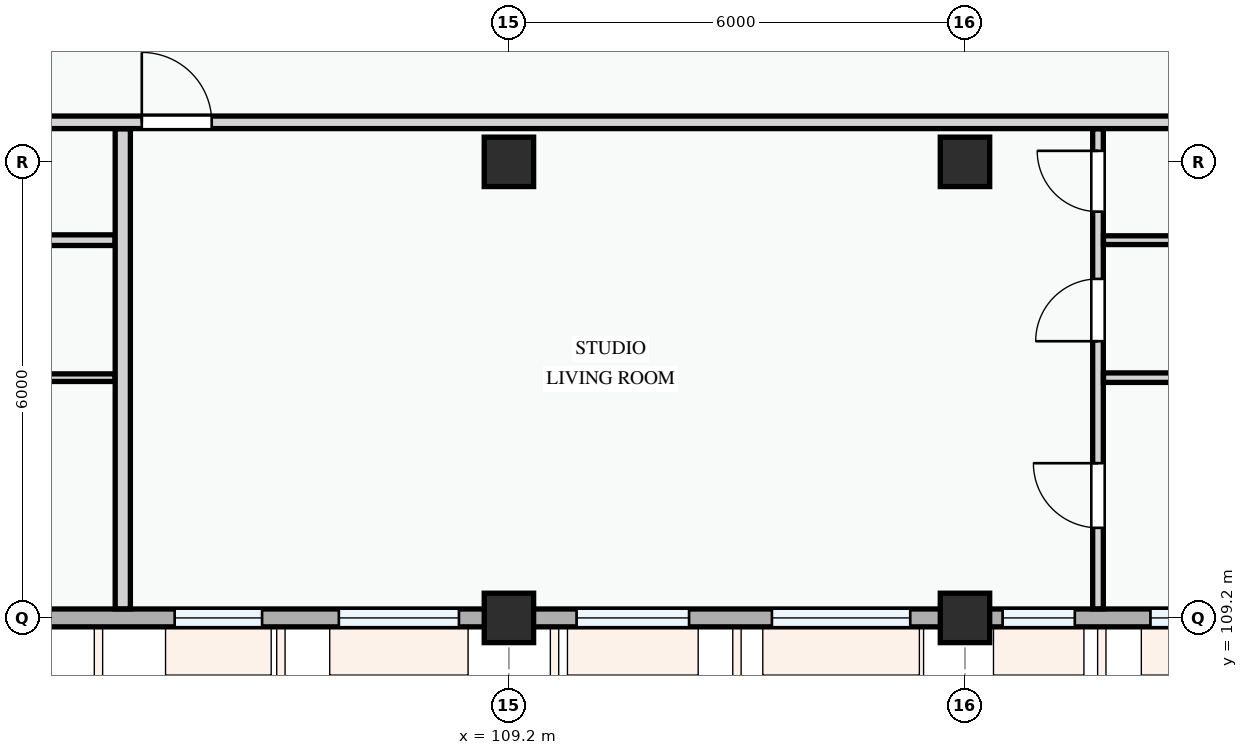
"""IFC4 building model, lengths in metres.
Left out: names, types, materials, properties, quantities, classifications, styles, units other than length and angle.
Written with IfcOpenShell. Run it as: python <this file> out.ifc"""

import sys

from ifc_helpers import new_model, si_unit, direction, frame, frame_2d, origin, origin_2d, place, context, subcontext, project, spatial, rectangle, extrude, element, fill, save


model = new_model("IFC4")
c1 = context("Model", 3, precision=1e-05, world=origin(), true_north=direction((0.0, 1.0)))
c2 = subcontext(c1, "Body", "Model", "MODEL_VIEW")
j1 = project(units=[si_unit("LENGTHUNIT", "METRE"), si_unit("PLANEANGLEUNIT", "RADIAN")], contexts=[c1])
p1 = place(None, origin())
s1 = spatial("IfcSite", under=j1, at=p1, CompositionType="ELEMENT")
p2 = place(p1, origin())
s2 = spatial("IfcBuilding", under=s1, at=p2, CompositionType="ELEMENT")
p3 = place(p2, frame((0.0, 0.0, 8.1)))
s3 = spatial("IfcBuildingStorey", under=s2, at=p3, CompositionType="ELEMENT", Elevation=8.1)
for number, where, z_axis, x_axis in (
    (1, (109.2, 109.2, 0.0), (0.0, 0.0, 1.0), (1.0, 0.0, 0.0)),
    (2, (109.2, 115.2, 0.0), (0.0, 0.0, 1.0), (1.0, 0.0, 0.0)),
    (3, (115.2, 109.2, 0.0), (0.0, 0.0, 1.0), (1.0, 0.0, 0.0)),
    (4, (115.2, 115.2, 0.0), (0.0, 0.0, 1.0), (1.0, 0.0, 0.0)),
):
    element("IfcColumn", number, at=place(p3, frame(where, z_axis=z_axis, x_axis=x_axis)), inside=s3, PredefinedType="COLUMN", context=c2, shape_type="SweptSolid", body=[
        extrude(rectangle(XDim=0.65, YDim=0.65, at=origin_2d()), origin(), (0.0, 0.0, 1.0), 3.3),
    ])
p4 = place(p3, frame((100.8, 109.2, 0.0), z_axis=(0.0, 0.0, 1.0), x_axis=(1.0, 0.0, 0.0)))
e5 = element("IfcWall", 5, at=p4, inside=s3, PredefinedType="STANDARD", context=c2, shape_type="SweptSolid", body=[
    extrude(rectangle(XDim=8.4, YDim=0.235, at=frame_2d((4.2, 0.0))), origin(), (0.0, 0.0, 1.0), 2.375),
])
p5 = place(p4, frame((1.255, 0.0, 0.78)))
e6 = element("IfcOpeningElement", 6, at=p5, cuts=e5, PredefinedType="OPENING", context=c2, shape_type="SweptSolid", body=[
    extrude(rectangle(XDim=1.0, YDim=1.25, at=frame_2d((0.5, 0.625))), frame((0.0, 0.127, 0.0), z_axis=(0.0, -1.0, 0.0), x_axis=(1.0, 0.0, 0.0)), (0.0, 0.0, 1.0), 0.255),
])
p6 = place(p4, frame((4.002, 0.0, 0.78)))
e7 = element("IfcOpeningElement", 7, at=p6, cuts=e5, PredefinedType="OPENING", context=c2, shape_type="SweptSolid", body=[
    extrude(rectangle(XDim=1.15, YDim=1.25, at=frame_2d((0.575, 0.625))), frame((0.0, 0.127, 0.0), z_axis=(0.0, -1.0, 0.0), x_axis=(1.0, 0.0, 0.0)), (0.0, 0.0, 1.0), 0.255),
])
p7 = place(p4, frame((6.163, 0.0, 0.78)))
e8 = element("IfcOpeningElement", 8, at=p7, cuts=e5, PredefinedType="OPENING", context=c2, shape_type="SweptSolid", body=[
    extrude(rectangle(XDim=1.58, YDim=1.48, at=frame_2d((0.79, 0.74))), frame((0.0, 0.127, 0.0), z_axis=(0.0, -1.0, 0.0), x_axis=(1.0, 0.0, 0.0)), (0.0, 0.0, 1.0), 0.255),
])
p8 = place(p3, frame((109.2, 109.2, 0.0), z_axis=(0.0, 0.0, 1.0), x_axis=(1.0, 0.0, 0.0)))
e9 = element("IfcWall", 9, at=p8, inside=s3, PredefinedType="STANDARD", context=c2, shape_type="SweptSolid", body=[
    extrude(rectangle(XDim=6.0, YDim=0.235, at=frame_2d((3.0, 0.0))), origin(), (0.0, 0.0, 1.0), 2.475),
])
p9 = place(p8, frame((0.89, 0.0, 0.78)))
e10 = element("IfcOpeningElement", 10, at=p9, cuts=e9, PredefinedType="OPENING", context=c2, shape_type="SweptSolid", body=[
    extrude(rectangle(XDim=1.48, YDim=1.52, at=frame_2d((0.74, 0.76))), frame((0.0, 0.127, 0.0), z_axis=(0.0, -1.0, 0.0), x_axis=(1.0, 0.0, 0.0)), (0.0, 0.0, 1.0), 0.255),
])
p10 = place(p8, frame((3.46, 0.0, 0.78)))
e11 = element("IfcOpeningElement", 11, at=p10, cuts=e9, PredefinedType="OPENING", context=c2, shape_type="SweptSolid", body=[
    extrude(rectangle(XDim=1.82, YDim=1.46, at=frame_2d((0.91, 0.73))), frame((0.0, 0.127, 0.0), z_axis=(0.0, -1.0, 0.0), x_axis=(1.0, 0.0, 0.0)), (0.0, 0.0, 1.0), 0.255),
])
p11 = place(p3, frame((115.2, 109.2, 0.0), z_axis=(0.0, 0.0, 1.0), x_axis=(1.0, 0.0, 0.0)))
e12 = element("IfcWall", 12, at=p11, inside=s3, PredefinedType="STANDARD", context=c2, shape_type="SweptSolid", body=[
    extrude(rectangle(XDim=8.4, YDim=0.235, at=frame_2d((4.2, 0.0))), origin(), (0.0, 0.0, 1.0), 2.375),
])
p12 = place(p11, frame((0.495, 0.0, 0.78)))
e13 = element("IfcOpeningElement", 13, at=p12, cuts=e12, PredefinedType="OPENING", context=c2, shape_type="SweptSolid", body=[
    extrude(rectangle(XDim=0.95, YDim=1.15, at=frame_2d((0.475, 0.575))), frame((0.0, 0.127, 0.0), z_axis=(0.0, -1.0, 0.0), x_axis=(1.0, 0.0, 0.0)), (0.0, 0.0, 1.0), 0.255),
])
p13 = place(p11, frame((2.44, 0.0, 0.78)))
e14 = element("IfcOpeningElement", 14, at=p13, cuts=e12, PredefinedType="OPENING", context=c2, shape_type="SweptSolid", body=[
    extrude(rectangle(XDim=1.92, YDim=1.44, at=frame_2d((0.96, 0.72))), frame((0.0, 0.127, 0.0), z_axis=(0.0, -1.0, 0.0), x_axis=(1.0, 0.0, 0.0)), (0.0, 0.0, 1.0), 0.255),
])
p14 = place(p11, frame((5.27, 0.0, 0.78)))
e15 = element("IfcOpeningElement", 15, at=p14, cuts=e12, PredefinedType="OPENING", context=c2, shape_type="SweptSolid", body=[
    extrude(rectangle(XDim=2.58, YDim=1.48, at=frame_2d((1.29, 0.74))), frame((0.0, 0.127, 0.0), z_axis=(0.0, -1.0, 0.0), x_axis=(1.0, 0.0, 0.0)), (0.0, 0.0, 1.0), 0.255),
])
p15 = place(p3, frame((92.35, 112.361, 0.0), z_axis=(0.0, 0.0, 1.0), x_axis=(1.0, 0.0, 0.0)))
e16 = element("IfcWall", 16, at=p15, inside=s3, PredefinedType="PARTITIONING", context=c2, shape_type="SweptSolid", body=[
    extrude(rectangle(XDim=11.668, YDim=0.1, at=frame_2d((5.834, 0.0))), origin(), (0.0, 0.0, 1.0), 3.0),
])
p16 = place(p3, frame((92.35, 114.17, 0.0), z_axis=(0.0, 0.0, 1.0), x_axis=(1.0, 0.0, 0.0)))
e17 = element("IfcWall", 17, at=p16, inside=s3, PredefinedType="PARTITIONING", context=c2, shape_type="SweptSolid", body=[
    extrude(rectangle(XDim=11.668, YDim=0.14, at=frame_2d((5.834, 0.0))), origin(), (0.0, 0.0, 1.0), 3.0),
])
p17 = place(p3, frame((116.95, 109.32, 0.0), z_axis=(0.0, 0.0, 1.0), x_axis=(0.0, 1.0, 0.0)))
e18 = element("IfcWall", 18, at=p17, inside=s3, PredefinedType="PARTITIONING", context=c2, shape_type="SweptSolid", body=[
    extrude(rectangle(XDim=6.316, YDim=0.14, at=frame_2d((3.158, 0.0))), origin(), (0.0, 0.0, 1.0), 3.0),
])
p18 = place(p17, frame((1.066, 0.0, 0.0)))
e19 = element("IfcOpeningElement", 19, at=p18, cuts=e18, PredefinedType="OPENING", context=c2, shape_type="SweptSolid", body=[
    extrude(rectangle(XDim=0.85, YDim=2.1, at=frame_2d((0.425, 1.05))), frame((0.0, 0.08, 0.0), z_axis=(0.0, -1.0, 0.0), x_axis=(1.0, 0.0, 0.0)), (0.0, 0.0, 1.0), 0.16),
])
p19 = place(p17, frame((3.521, 0.0, 0.0)))
e20 = element("IfcOpeningElement", 20, at=p19, cuts=e18, PredefinedType="OPENING", context=c2, shape_type="SweptSolid", body=[
    extrude(rectangle(XDim=0.82, YDim=2.08, at=frame_2d((0.41, 1.04))), frame((0.0, 0.08, 0.0), z_axis=(0.0, -1.0, 0.0), x_axis=(1.0, 0.0, 0.0)), (0.0, 0.0, 1.0), 0.16),
])
p20 = place(p17, frame((5.225, 0.0, 0.0)))
e21 = element("IfcOpeningElement", 21, at=p20, cuts=e18, PredefinedType="OPENING", context=c2, shape_type="SweptSolid", body=[
    extrude(rectangle(XDim=0.8, YDim=2.1, at=frame_2d((0.4, 1.05))), frame((0.0, 0.08, 0.0), z_axis=(0.0, -1.0, 0.0), x_axis=(1.0, 0.0, 0.0)), (0.0, 0.0, 1.0), 0.16),
])
p21 = place(p3, frame((117.022, 112.361, 0.0), z_axis=(0.0, 0.0, 1.0), x_axis=(1.0, 0.0, 0.0)))
e22 = element("IfcWall", 22, at=p21, inside=s3, PredefinedType="PARTITIONING", context=c2, shape_type="SweptSolid", body=[
    extrude(rectangle(XDim=10.664, YDim=0.125, at=frame_2d((5.332, 0.0))), origin(), (0.0, 0.0, 1.0), 3.0),
])
p22 = place(p3, frame((117.022, 114.17, 0.0), z_axis=(0.0, 0.0, 1.0), x_axis=(1.0, 0.0, 0.0)))
e23 = element("IfcWall", 23, at=p22, inside=s3, PredefinedType="PARTITIONING", context=c2, shape_type="SweptSolid", body=[
    extrude(rectangle(XDim=10.664, YDim=0.115, at=frame_2d((5.332, 0.0))), origin(), (0.0, 0.0, 1.0), 3.0),
])
p23 = place(p3, frame((104.12, 109.32, 0.0), z_axis=(0.0, 0.0, 1.0), x_axis=(0.0, 1.0, 0.0)))
e24 = element("IfcWall", 24, at=p23, inside=s3, PredefinedType="PARTITIONING", context=c2, shape_type="SweptSolid", body=[
    extrude(rectangle(XDim=6.316, YDim=0.2, at=frame_2d((3.158, 0.0))), origin(), (0.0, 0.0, 1.0), 3.0),
])
p24 = place(p3, frame((80.52, 115.72, 0.0), z_axis=(0.0, 0.0, 1.0), x_axis=(1.0, 0.0, 0.0)))
e25 = element("IfcWall", 25, at=p24, inside=s3, PredefinedType="PARTITIONING", context=c2, shape_type="SweptSolid", body=[
    extrude(rectangle(XDim=69.531, YDim=0.165, at=frame_2d((34.765, 0.0))), origin(), (0.0, 0.0, 1.0), 3.0),
])
p25 = place(p24, frame((9.588, 0.0, 0.0)))
e26 = element("IfcOpeningElement", 26, at=p25, cuts=e25, PredefinedType="OPENING", context=c2, shape_type="SweptSolid", body=[
    extrude(rectangle(XDim=0.92, YDim=2.1, at=frame_2d((0.46, 1.05))), frame((0.0, 0.093, 0.0), z_axis=(0.0, -1.0, 0.0), x_axis=(1.0, 0.0, 0.0)), (0.0, 0.0, 1.0), 0.185),
])
p26 = place(p24, frame((23.851, 0.0, 0.0)))
e27 = element("IfcOpeningElement", 27, at=p26, cuts=e25, PredefinedType="OPENING", context=c2, shape_type="SweptSolid", body=[
    extrude(rectangle(XDim=0.92, YDim=2.1, at=frame_2d((0.46, 1.05))), frame((0.0, 0.093, 0.0), z_axis=(0.0, -1.0, 0.0), x_axis=(1.0, 0.0, 0.0)), (0.0, 0.0, 1.0), 0.185),
])
p27 = place(p24, frame((52.798, 0.0, 0.0)))
e28 = element("IfcOpeningElement", 28, at=p27, cuts=e25, PredefinedType="OPENING", context=c2, shape_type="SweptSolid", body=[
    extrude(rectangle(XDim=0.96, YDim=2.12, at=frame_2d((0.48, 1.06))), frame((0.0, 0.093, 0.0), z_axis=(0.0, -1.0, 0.0), x_axis=(1.0, 0.0, 0.0)), (0.0, 0.0, 1.0), 0.185),
])
p28 = place(p6, origin())
e29 = element("IfcWindow", 29, at=p28, inside=s3, PartitioningType="SINGLE_PANEL", PredefinedType="WINDOW", context=c2, shape_type="SweptSolid", body=[
    extrude(rectangle(XDim=1.15, YDim=1.25, at=frame_2d((0.575, 0.625))), frame((0.0, 0.03, 0.0), z_axis=(0.0, -1.0, 0.0), x_axis=(1.0, 0.0, 0.0)), (0.0, 0.0, 1.0), 0.06),
])
fill(e7, e29)
p29 = place(p7, origin())
e30 = element("IfcWindow", 30, at=p29, inside=s3, PartitioningType="SINGLE_PANEL", PredefinedType="WINDOW", context=c2, shape_type="SweptSolid", body=[
    extrude(rectangle(XDim=1.58, YDim=1.48, at=frame_2d((0.79, 0.74))), frame((0.0, 0.03, 0.0), z_axis=(0.0, -1.0, 0.0), x_axis=(1.0, 0.0, 0.0)), (0.0, 0.0, 1.0), 0.06),
])
fill(e8, e30)
p30 = place(p9, origin())
e31 = element("IfcWindow", 31, at=p30, inside=s3, PartitioningType="SINGLE_PANEL", PredefinedType="WINDOW", context=c2, shape_type="SweptSolid", body=[
    extrude(rectangle(XDim=1.48, YDim=1.52, at=frame_2d((0.74, 0.76))), frame((0.0, 0.03, 0.0), z_axis=(0.0, -1.0, 0.0), x_axis=(1.0, 0.0, 0.0)), (0.0, 0.0, 1.0), 0.06),
])
fill(e10, e31)
p31 = place(p10, origin())
e32 = element("IfcWindow", 32, at=p31, inside=s3, PartitioningType="DOUBLE_PANEL_VERTICAL", PredefinedType="WINDOW", context=c2, shape_type="SweptSolid", body=[
    extrude(rectangle(XDim=1.82, YDim=1.46, at=frame_2d((0.91, 0.73))), frame((0.0, 0.03, 0.0), z_axis=(0.0, -1.0, 0.0), x_axis=(1.0, 0.0, 0.0)), (0.0, 0.0, 1.0), 0.06),
])
fill(e11, e32)
p32 = place(p12, origin())
e33 = element("IfcWindow", 33, at=p32, inside=s3, PartitioningType="SINGLE_PANEL", PredefinedType="WINDOW", context=c2, shape_type="SweptSolid", body=[
    extrude(rectangle(XDim=0.95, YDim=1.15, at=frame_2d((0.475, 0.575))), frame((0.0, 0.03, 0.0), z_axis=(0.0, -1.0, 0.0), x_axis=(1.0, 0.0, 0.0)), (0.0, 0.0, 1.0), 0.06),
])
fill(e13, e33)
p33 = place(p13, origin())
e34 = element("IfcWindow", 34, at=p33, inside=s3, PartitioningType="DOUBLE_PANEL_VERTICAL", PredefinedType="WINDOW", context=c2, shape_type="SweptSolid", body=[
    extrude(rectangle(XDim=1.92, YDim=1.44, at=frame_2d((0.96, 0.72))), frame((0.0, 0.03, 0.0), z_axis=(0.0, -1.0, 0.0), x_axis=(1.0, 0.0, 0.0)), (0.0, 0.0, 1.0), 0.06),
])
fill(e14, e34)
p34 = place(p18, origin())
e35 = element("IfcDoor", 35, at=p34, inside=s3, OperationType="SINGLE_SWING_RIGHT", PredefinedType="DOOR", context=c2, shape_type="SweptSolid", body=[
    extrude(rectangle(XDim=0.85, YDim=2.1, at=frame_2d((0.425, 1.05))), frame((0.0, 0.025, 0.0), z_axis=(0.0, -1.0, 0.0), x_axis=(1.0, 0.0, 0.0)), (0.0, 0.0, 1.0), 0.05),
])
fill(e19, e35)
p35 = place(p19, origin())
e36 = element("IfcDoor", 36, at=p35, inside=s3, OperationType="SINGLE_SWING_LEFT", PredefinedType="DOOR", context=c2, shape_type="SweptSolid", body=[
    extrude(rectangle(XDim=0.82, YDim=2.08, at=frame_2d((0.41, 1.04))), frame((0.0, 0.025, 0.0), z_axis=(0.0, -1.0, 0.0), x_axis=(1.0, 0.0, 0.0)), (0.0, 0.0, 1.0), 0.05),
])
fill(e20, e36)
p36 = place(p20, origin())
e37 = element("IfcDoor", 37, at=p36, inside=s3, OperationType="SINGLE_SWING_RIGHT", PredefinedType="DOOR", context=c2, shape_type="SweptSolid", body=[
    extrude(rectangle(XDim=0.8, YDim=2.1, at=frame_2d((0.4, 1.05))), frame((0.0, 0.025, 0.0), z_axis=(0.0, -1.0, 0.0), x_axis=(1.0, 0.0, 0.0)), (0.0, 0.0, 1.0), 0.05),
])
fill(e21, e37)
p37 = place(p26, origin())
e38 = element("IfcDoor", 38, at=p37, inside=s3, OperationType="SINGLE_SWING_LEFT", PredefinedType="DOOR", context=c2, shape_type="SweptSolid", body=[
    extrude(rectangle(XDim=0.92, YDim=2.1, at=frame_2d((0.46, 1.05))), frame((0.0, 0.025, 0.0), z_axis=(0.0, -1.0, 0.0), x_axis=(1.0, 0.0, 0.0)), (0.0, 0.0, 1.0), 0.05),
])
fill(e27, e38)
save(model, sys.argv[1])
